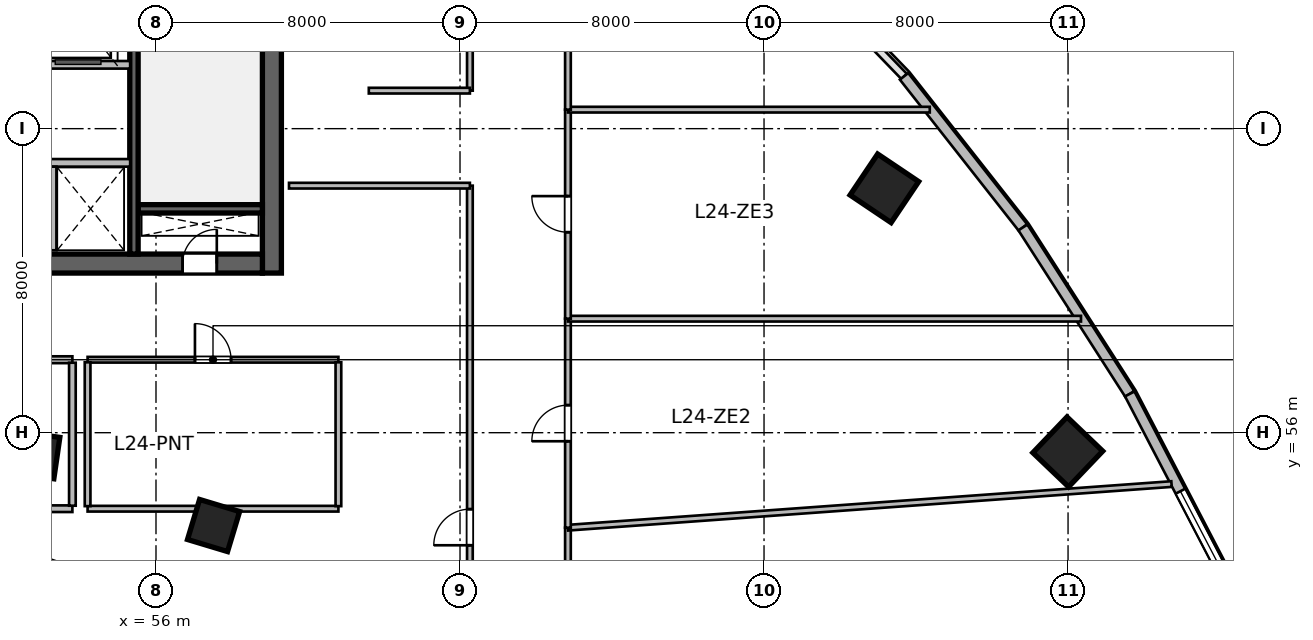
"""IFC4 building model, lengths in metres.
Left out: names, types, materials, properties, quantities, classifications, styles, units other than length and angle.
Written with IfcOpenShell. Run it as: python <this file> out.ifc"""

import sys

from ifc_helpers import new_model, si_unit, direction, frame, frame_2d, origin, origin_2d, place, context, subcontext, project, spatial, rectangle, extrude, source, transform, mapped, element, fill, save


model = new_model("IFC4")
c1 = context("Model", 3, precision=1e-05, world=origin(), true_north=direction((0.0, 1.0)))
c2 = subcontext(c1, "Body", "Model", "MODEL_VIEW")
j1 = project(units=[si_unit("LENGTHUNIT", "METRE"), si_unit("PLANEANGLEUNIT", "RADIAN")], contexts=[c1])
p1 = place(None, origin())
s1 = spatial("IfcSite", under=j1, at=p1, CompositionType="ELEMENT")
p2 = place(p1, origin())
s2 = spatial("IfcBuilding", under=s1, at=p2, CompositionType="ELEMENT")
p3 = place(p2, frame((0.0, 0.0, 103.8)))
s3 = spatial("IfcBuildingStorey", under=s2, at=p3, CompositionType="ELEMENT", Elevation=103.8)
m1 = source(origin(), c2, "Body", "SweptSolid", [
    extrude(rectangle(XDim=12.0, YDim=0.5, at=frame_2d((6.0, 0.0))), origin(), (0.0, 0.0, 1.0), 3.9),
])
p4 = place(p3, frame((59.05, 60.2, 0.0), z_axis=(0.0, 0.0, 1.0), x_axis=(0.0, 1.0, 0.0)))
e1 = element("IfcWall", 1, at=p4, inside=s3, PredefinedType="SHEAR", context=c2, shape_type="MappedRepresentation", body=[
    mapped(m1, transform((0.0, 0.0, 0.0), scale=1.0)),
])
m2 = source(origin(), c2, "Body", "SweptSolid", [
    extrude(rectangle(XDim=21.6, YDim=0.5, at=frame_2d((10.8, 0.0))), origin(), (0.0, 0.0, 1.0), 3.9),
])
p5 = place(p3, frame((37.2, 60.45, 0.0), z_axis=(0.0, 0.0, 1.0), x_axis=(1.0, 0.0, 0.0)))
e2 = element("IfcWall", 2, at=p5, inside=s3, PredefinedType="SHEAR", context=c2, shape_type="MappedRepresentation", body=[
    mapped(m2, transform((0.0, 0.0, 0.0), scale=1.0)),
])
p6 = place(p5, frame((1.1, 0.0, 0.0)))
e3 = element("IfcOpeningElement", 3, at=p6, cuts=e2, PredefinedType="OPENING", context=c2, shape_type="SweptSolid", body=[
    extrude(rectangle(XDim=1.15, YDim=2.15, at=frame_2d((0.575, 1.075))), frame((0.0, 0.26, 0.0), z_axis=(0.0, -1.0, 0.0), x_axis=(1.0, 0.0, 0.0)), (0.0, 0.0, 1.0), 0.52),
])
p7 = place(p5, frame((19.5, 0.0, 0.0)))
e4 = element("IfcOpeningElement", 4, at=p7, cuts=e2, PredefinedType="OPENING", context=c2, shape_type="SweptSolid", body=[
    extrude(rectangle(XDim=0.9, YDim=2.1, at=frame_2d((0.45, 1.05))), frame((0.0, 0.26, 0.0), z_axis=(0.0, -1.0, 0.0), x_axis=(1.0, 0.0, 0.0)), (0.0, 0.0, 1.0), 0.52),
])
p8 = place(p5, frame((12.02, 0.0, 0.0)))
e5 = element("IfcOpeningElement", 5, at=p8, cuts=e2, PredefinedType="OPENING", context=c2, shape_type="SweptSolid", body=[
    extrude(rectangle(XDim=1.6, YDim=2.15, at=frame_2d((0.8, 1.075))), frame((0.0, 0.26, 0.0), z_axis=(0.0, -1.0, 0.0), x_axis=(1.0, 0.0, 0.0)), (0.0, 0.0, 1.0), 0.52),
])
m3 = source(origin(), c2, "Body", "SweptSolid", [
    extrude(rectangle(XDim=3.27, YDim=0.22, at=frame_2d((1.635, 0.0))), origin(), (0.0, 0.0, 1.0), 3.9),
])
p9 = place(p3, frame((55.53, 61.89, 0.0), z_axis=(0.0, 0.0, 1.0), x_axis=(1.0, 0.0, 0.0)))
e6 = element("IfcWall", 6, at=p9, inside=s3, PredefinedType="SHEAR", context=c2, shape_type="MappedRepresentation", body=[
    mapped(m3, transform((0.0, 0.0, 0.0), scale=1.0)),
])
m4 = source(origin(), c2, "Body", "SweptSolid", [
    extrude(rectangle(XDim=11.0, YDim=0.22, at=frame_2d((5.5, 0.0))), origin(), (0.0, 0.0, 1.0), 3.9),
])
p10 = place(p3, frame((55.42, 60.7, 0.0), z_axis=(0.0, 0.0, 1.0), x_axis=(0.0, 1.0, 0.0)))
e7 = element("IfcWall", 7, at=p10, inside=s3, PredefinedType="SHEAR", context=c2, shape_type="MappedRepresentation", body=[
    mapped(m4, transform((0.0, 0.0, 0.0), scale=1.0)),
])
p11 = place(p10, frame((9.545, 0.0, 0.0)))
e8 = element("IfcOpeningElement", 8, at=p11, cuts=e7, PredefinedType="OPENING", context=c2, shape_type="SweptSolid", body=[
    extrude(rectangle(XDim=1.15, YDim=2.15, at=frame_2d((0.575, 1.075))), frame((0.0, 0.12, 0.0), z_axis=(0.0, -1.0, 0.0), x_axis=(1.0, 0.0, 0.0)), (0.0, 0.0, 1.0), 0.24),
])
m5 = source(origin(), c2, "Body", "SweptSolid", [
    extrude(rectangle(XDim=1.1, YDim=1.1, at=origin_2d()), origin(), (0.0, 0.0, 1.0), 3.9),
])
for number, where, z_axis, x_axis in (
    (9, (52.846, 55.411, 0.0), (0.0, 0.0, 1.0), (0.143, 0.99, 0.0)),
    (10, (57.515, 53.558, 0.0), (0.0, 0.0, 1.0), (0.289, 0.957, 0.0)),
):
    element("IfcColumn", number, at=place(p3, frame(where, z_axis=z_axis, x_axis=x_axis)), inside=s3, PredefinedType="COLUMN", context=c2, shape_type="MappedRepresentation", body=[
        mapped(m5, transform((0.0, 0.0, 0.0), scale=1.0)),
    ])
m6 = source(origin(), c2, "Body", "SweptSolid", [
    extrude(rectangle(XDim=1.3, YDim=1.3, at=origin_2d()), origin(), (0.0, 0.0, 1.0), 3.9),
])
for number, where, z_axis, x_axis in (
    (11, (75.167, 62.43, 0.0), (0.0, 0.0, 1.0), (0.558, 0.83, 0.0)),
    (12, (79.993, 55.494, 0.0), (0.0, 0.0, 1.0), (0.691, 0.723, 0.0)),
):
    element("IfcColumn", number, at=place(p3, frame(where, z_axis=z_axis, x_axis=x_axis)), inside=s3, PredefinedType="COLUMN", context=c2, shape_type="MappedRepresentation", body=[
        mapped(m6, transform((0.0, 0.0, 0.0), scale=1.0)),
    ])
m7 = source(origin(), c2, "Body", "SweptSolid", [
    extrude(rectangle(XDim=2.411, YDim=0.28, at=frame_2d((1.205, 0.0))), origin(), (0.0, 0.0, 1.0), 3.65),
])
p12 = place(p3, frame((55.012, 51.899, 0.0), z_axis=(0.0, 0.0, 1.0), x_axis=(-0.944880068161, 0.327416640982, 0.0)))
e13 = element("IfcWall", 13, at=p12, inside=s3, PredefinedType="SOLIDWALL", context=c2, shape_type="MappedRepresentation", body=[
    mapped(m7, transform((0.0, 0.0, 0.0), scale=1.0)),
])
m8 = source(origin(), c2, "Body", "SweptSolid", [
    extrude(rectangle(XDim=5.058, YDim=0.28, at=frame_2d((2.529, 0.0))), origin(), (0.0, 0.0, 1.0), 3.65),
])
p13 = place(p3, frame((75.685, 65.376, 0.0), z_axis=(0.0, 0.0, 1.0), x_axis=(0.618145507434, -0.786063694391, 0.0)))
e14 = element("IfcWall", 14, at=p13, inside=s3, PredefinedType="SOLIDWALL", context=c2, shape_type="MappedRepresentation", body=[
    mapped(m8, transform((0.0, 0.0, 0.0), scale=1.0)),
])
m9 = source(origin(), c2, "Body", "SweptSolid", [
    extrude(rectangle(XDim=5.205, YDim=0.28, at=frame_2d((2.603, 0.0))), origin(), (0.0, 0.0, 1.0), 3.65),
])
p14 = place(p3, frame((78.812, 61.4, 0.0), z_axis=(0.0, 0.0, 1.0), x_axis=(0.540188528895, -0.8415440293, 0.0)))
e15 = element("IfcWall", 15, at=p14, inside=s3, PredefinedType="SOLIDWALL", context=c2, shape_type="MappedRepresentation", body=[
    mapped(m9, transform((0.0, 0.0, 0.0), scale=1.0)),
])
m10 = source(origin(), c2, "Body", "SweptSolid", [
    extrude(rectangle(XDim=5.315, YDim=0.28, at=frame_2d((2.658, 0.0))), origin(), (0.0, 0.0, 1.0), 3.65),
])
p15 = place(p3, frame((81.623, 57.02, 0.0), z_axis=(0.0, 0.0, 1.0), x_axis=(0.461760527822, -0.887004630735, 0.0)))
e16 = element("IfcWall", 16, at=p15, inside=s3, PredefinedType="SOLIDWALL", context=c2, shape_type="MappedRepresentation", body=[
    mapped(m10, transform((0.0, 0.0, 0.0), scale=1.0)),
])
p16 = place(p15, frame((2.886, 0.0, 0.95)))
e17 = element("IfcOpeningElement", 17, at=p16, cuts=e16, PredefinedType="OPENING", context=c2, shape_type="SweptSolid", body=[
    extrude(rectangle(XDim=2.2, YDim=2.1, at=frame_2d((1.1, 1.05))), frame((0.0, 0.15, 0.0), z_axis=(0.0, -1.0, 0.0), x_axis=(1.0, 0.0, 0.0)), (0.0, 0.0, 1.0), 0.3),
])
m11 = source(origin(), c2, "Body", "SweptSolid", [
    extrude(rectangle(XDim=5.62, YDim=0.2, at=frame_2d((2.81, 0.0))), origin(), (0.0, 0.0, 1.0), 3.65),
])
p17 = place(p3, frame((49.7, 65.68, 0.0), z_axis=(0.0, 0.0, 1.0), x_axis=(1.0, 0.0, 0.0)))
e18 = element("IfcWall", 18, at=p17, inside=s3, PredefinedType="SOLIDWALL", context=c2, shape_type="MappedRepresentation", body=[
    mapped(m11, transform((0.0, 0.0, 0.0), scale=1.0)),
])
m12 = source(origin(), c2, "Body", "SweptSolid", [
    extrude(rectangle(XDim=4.1, YDim=0.2, at=frame_2d((2.05, 0.0))), origin(), (0.0, 0.0, 1.0), 3.65),
])
p18 = place(p3, frame((51.22, 63.1, 0.0), z_axis=(0.0, 0.0, 1.0), x_axis=(1.0, 0.0, 0.0)))
e19 = element("IfcWall", 19, at=p18, inside=s3, PredefinedType="SOLIDWALL", context=c2, shape_type="MappedRepresentation", body=[
    mapped(m12, transform((0.0, 0.0, 0.0), scale=1.0)),
])
m13 = source(origin(), c2, "Body", "SweptSolid", [
    extrude(rectangle(XDim=2.2, YDim=0.2, at=frame_2d((1.1, 0.0))), origin(), (0.0, 0.0, 1.0), 3.65),
])
p19 = place(p3, frame((53.28, 60.8, 0.0), z_axis=(0.0, 0.0, 1.0), x_axis=(0.0, 1.0, 0.0)))
e20 = element("IfcWall", 20, at=p19, inside=s3, PredefinedType="SOLIDWALL", context=c2, shape_type="MappedRepresentation", body=[
    mapped(m13, transform((0.0, 0.0, 0.0), scale=1.0)),
])
m14 = source(origin(), c2, "Body", "SweptSolid", [
    extrude(rectangle(XDim=3.248, YDim=0.175, at=frame_2d((1.624, 0.0))), origin(), (0.0, 0.0, 1.0), 3.65),
])
p20 = place(p3, frame((50.552, 54.0, 0.0), z_axis=(0.0, 0.0, 1.0), x_axis=(1.0, 0.0, 0.0)))
e21 = element("IfcWall", 21, at=p20, inside=s3, PredefinedType="PARTITIONING", context=c2, shape_type="MappedRepresentation", body=[
    mapped(m14, transform((0.0, 0.0, 0.0), scale=1.0)),
])
m15 = source(origin(), c2, "Body", "SweptSolid", [
    extrude(rectangle(XDim=3.248, YDim=0.18, at=frame_2d((1.624, 0.0))), origin(), (0.0, 0.0, 1.0), 3.65),
])
p21 = place(p3, frame((50.552, 57.92, 0.0), z_axis=(0.0, 0.0, 1.0), x_axis=(1.0, 0.0, 0.0)))
e22 = element("IfcWall", 22, at=p21, inside=s3, PredefinedType="PLUMBINGWALL", context=c2, shape_type="MappedRepresentation", body=[
    mapped(m15, transform((0.0, 0.0, 0.0), scale=1.0)),
])
p22 = place(p21, frame((1.149, 0.0, 0.0)))
e23 = element("IfcOpeningElement", 23, at=p22, cuts=e22, PredefinedType="OPENING", context=c2, shape_type="SweptSolid", body=[
    extrude(rectangle(XDim=0.95, YDim=2.12, at=frame_2d((0.475, 1.06))), frame((0.0, 0.1, 0.0), z_axis=(0.0, -1.0, 0.0), x_axis=(1.0, 0.0, 0.0)), (0.0, 0.0, 1.0), 0.2),
])
m16 = source(origin(), c2, "Body", "SweptSolid", [
    extrude(rectangle(XDim=3.763, YDim=0.175, at=frame_2d((1.881, 0.0))), origin(), (0.0, 0.0, 1.0), 3.65),
])
p23 = place(p3, frame((53.8, 54.079, 0.0), z_axis=(0.0, 0.0, 1.0), x_axis=(0.0, 1.0, 0.0)))
e24 = element("IfcWall", 24, at=p23, inside=s3, PredefinedType="PARTITIONING", context=c2, shape_type="MappedRepresentation", body=[
    mapped(m16, transform((0.0, 0.0, 0.0), scale=1.0)),
])
m17 = source(origin(), c2, "Body", "SweptSolid", [
    extrude(rectangle(XDim=6.6, YDim=0.15, at=frame_2d((3.3, 0.0))), origin(), (0.0, 0.0, 1.0), 3.095),
])
p24 = place(p3, frame((54.2, 54.0, 0.0), z_axis=(0.0, 0.0, 1.0), x_axis=(1.0, 0.0, 0.0)))
e25 = element("IfcWall", 25, at=p24, inside=s3, PredefinedType="PARTITIONING", context=c2, shape_type="MappedRepresentation", body=[
    mapped(m17, transform((0.0, 0.0, 0.0), scale=1.0)),
])
m18 = source(origin(), c2, "Body", "SweptSolid", [
    extrude(rectangle(XDim=6.6, YDim=0.15, at=frame_2d((3.3, 0.0))), origin(), (0.0, 0.0, 1.0), 3.65),
])
p25 = place(p3, frame((54.2, 57.92, 0.0), z_axis=(0.0, 0.0, 1.0), x_axis=(1.0, 0.0, 0.0)))
e26 = element("IfcWall", 26, at=p25, inside=s3, PredefinedType="PARTITIONING", context=c2, shape_type="MappedRepresentation", body=[
    mapped(m18, transform((0.0, 0.0, 0.0), scale=1.0)),
])
p26 = place(p25, frame((2.825, 0.0, 0.0)))
e27 = element("IfcOpeningElement", 27, at=p26, cuts=e26, PredefinedType="OPENING", context=c2, shape_type="SweptSolid", body=[
    extrude(rectangle(XDim=0.95, YDim=2.1, at=frame_2d((0.475, 1.05))), frame((0.0, 0.085, 0.0), z_axis=(0.0, -1.0, 0.0), x_axis=(1.0, 0.0, 0.0)), (0.0, 0.0, 1.0), 0.17),
])
m19 = source(origin(), c2, "Body", "SweptSolid", [
    extrude(rectangle(XDim=3.785, YDim=0.15, at=frame_2d((1.893, 0.0))), origin(), (0.0, 0.0, 1.0), 3.65),
])
for number, where, z_axis, x_axis in (
    (28, (54.2, 54.067, 0.0), (0.0, 0.0, 1.0), (0.0, 1.0, 0.0)),
    (29, (60.8, 54.067, 0.0), (0.0, 0.0, 1.0), (0.0, 1.0, 0.0)),
):
    element("IfcWall", number, at=place(p3, frame(where, z_axis=z_axis, x_axis=x_axis)), inside=s3, PredefinedType="PARTITIONING", context=c2, shape_type="MappedRepresentation", body=[
        mapped(m19, transform((0.0, 0.0, 0.0), scale=1.0)),
    ])
m20 = source(origin(), c2, "Body", "SweptSolid", [
    extrude(rectangle(XDim=12.894, YDim=0.15, at=frame_2d((6.447, 0.0))), origin(), (0.0, 0.0, 1.0), 2.942),
])
p27 = place(p3, frame((66.84, 40.606, 0.0), z_axis=(0.0, 0.0, 1.0), x_axis=(0.0, 1.0, 0.0)))
e30 = element("IfcWall", 30, at=p27, inside=s3, PredefinedType="PARTITIONING", context=c2, shape_type="MappedRepresentation", body=[
    mapped(m20, transform((0.0, 0.0, 0.0), scale=1.0)),
])
p28 = place(p27, frame((9.744, 0.0, 0.0)))
e31 = element("IfcOpeningElement", 31, at=p28, cuts=e30, PredefinedType="OPENING", context=c2, shape_type="SweptSolid", body=[
    extrude(rectangle(XDim=0.95, YDim=2.1, at=frame_2d((0.475, 1.05))), frame((0.0, 0.085, 0.0), z_axis=(0.0, -1.0, 0.0), x_axis=(1.0, 0.0, 0.0)), (0.0, 0.0, 1.0), 0.17),
])
m21 = source(origin(), c2, "Body", "SweptSolid", [
    extrude(rectangle(XDim=15.924, YDim=0.15, at=frame_2d((7.962, 0.0))), origin(), (0.0, 0.0, 1.0), 3.65),
])
p29 = place(p3, frame((66.84, 53.5, 0.0), z_axis=(0.0, 0.0, 1.0), x_axis=(0.997397082693, 0.072104503572, 0.0)))
e32 = element("IfcWall", 32, at=p29, inside=s3, PredefinedType="PARTITIONING", context=c2, shape_type="MappedRepresentation", body=[
    mapped(m21, transform((0.0, 0.0, 0.0), scale=1.0)),
])
m22 = source(origin(), c2, "Body", "SweptSolid", [
    extrude(rectangle(XDim=5.5, YDim=0.15, at=frame_2d((2.75, 0.0))), origin(), (0.0, 0.0, 1.0), 3.022),
])
p30 = place(p3, frame((66.84, 53.5, 0.0), z_axis=(0.0, 0.0, 1.0), x_axis=(0.0, 1.0, 0.0)))
e33 = element("IfcWall", 33, at=p30, inside=s3, PredefinedType="PARTITIONING", context=c2, shape_type="MappedRepresentation", body=[
    mapped(m22, transform((0.0, 0.0, 0.0), scale=1.0)),
])
p31 = place(p30, frame((2.275, 0.0, 0.0)))
e34 = element("IfcOpeningElement", 34, at=p31, cuts=e33, PredefinedType="OPENING", context=c2, shape_type="SweptSolid", body=[
    extrude(rectangle(XDim=0.95, YDim=2.1, at=frame_2d((0.475, 1.05))), frame((0.0, 0.085, 0.0), z_axis=(0.0, -1.0, 0.0), x_axis=(1.0, 0.0, 0.0)), (0.0, 0.0, 1.0), 0.17),
])
m23 = source(origin(), c2, "Body", "SweptSolid", [
    extrude(rectangle(XDim=13.5, YDim=0.15, at=frame_2d((6.75, 0.0))), origin(), (0.0, 0.0, 1.0), 3.65),
])
p32 = place(p3, frame((66.84, 59.0, 0.0), z_axis=(0.0, 0.0, 1.0), x_axis=(1.0, 0.0, 0.0)))
e35 = element("IfcWall", 35, at=p32, inside=s3, PredefinedType="PARTITIONING", context=c2, shape_type="MappedRepresentation", body=[
    mapped(m23, transform((0.0, 0.0, 0.0), scale=1.0)),
])
m24 = source(origin(), c2, "Body", "SweptSolid", [
    extrude(rectangle(XDim=5.5, YDim=0.15, at=frame_2d((2.75, 0.0))), origin(), (0.0, 0.0, 1.0), 2.942),
])
p33 = place(p3, frame((66.84, 59.0, 0.0), z_axis=(0.0, 0.0, 1.0), x_axis=(0.0, 1.0, 0.0)))
e36 = element("IfcWall", 36, at=p33, inside=s3, PredefinedType="PARTITIONING", context=c2, shape_type="MappedRepresentation", body=[
    mapped(m24, transform((0.0, 0.0, 0.0), scale=1.0)),
])
p34 = place(p33, frame((2.275, 0.0, 0.0)))
e37 = element("IfcOpeningElement", 37, at=p34, cuts=e36, PredefinedType="OPENING", context=c2, shape_type="SweptSolid", body=[
    extrude(rectangle(XDim=0.95, YDim=2.1, at=frame_2d((0.475, 1.05))), frame((0.0, 0.085, 0.0), z_axis=(0.0, -1.0, 0.0), x_axis=(1.0, 0.0, 0.0)), (0.0, 0.0, 1.0), 0.17),
])
m25 = source(origin(), c2, "Body", "SweptSolid", [
    extrude(rectangle(XDim=9.521, YDim=0.15, at=frame_2d((4.761, 0.0))), origin(), (0.0, 0.0, 1.0), 3.65),
])
p35 = place(p3, frame((66.84, 64.5, 0.0), z_axis=(0.0, 0.0, 1.0), x_axis=(1.0, 0.0, 0.0)))
e38 = element("IfcWall", 38, at=p35, inside=s3, PredefinedType="PARTITIONING", context=c2, shape_type="MappedRepresentation", body=[
    mapped(m25, transform((0.0, 0.0, 0.0), scale=1.0)),
])
m26 = source(origin(), c2, "Body", "SweptSolid", [
    extrude(rectangle(XDim=8.613, YDim=0.15, at=frame_2d((4.307, 0.0))), origin(), (0.0, 0.0, 1.0), 3.65),
])
p36 = place(p3, frame((66.84, 64.5, 0.0), z_axis=(0.0, 0.0, 1.0), x_axis=(0.0, 1.0, 0.0)))
e39 = element("IfcWall", 39, at=p36, inside=s3, PredefinedType="PARTITIONING", context=c2, shape_type="MappedRepresentation", body=[
    mapped(m26, transform((0.0, 0.0, 0.0), scale=1.0)),
])
p37 = place(p36, frame((3.832, 0.0, 0.0)))
e40 = element("IfcOpeningElement", 40, at=p37, cuts=e39, PredefinedType="OPENING", context=c2, shape_type="SweptSolid", body=[
    extrude(rectangle(XDim=0.95, YDim=2.1, at=frame_2d((0.475, 1.05))), frame((0.0, 0.085, 0.0), z_axis=(0.0, -1.0, 0.0), x_axis=(1.0, 0.0, 0.0)), (0.0, 0.0, 1.0), 0.17),
])
m27 = source(origin(), c2, "Body", "SweptSolid", [
    extrude(rectangle(XDim=17.974, YDim=0.15, at=frame_2d((8.987, 0.0))), origin(), (0.0, 0.0, 1.0), 2.942),
])
p38 = place(p3, frame((64.26, 44.526, 0.0), z_axis=(0.0, 0.0, 1.0), x_axis=(0.0, 1.0, 0.0)))
e41 = element("IfcWall", 41, at=p38, inside=s3, PredefinedType="PARTITIONING", context=c2, shape_type="MappedRepresentation", body=[
    mapped(m27, transform((0.0, 0.0, 0.0), scale=1.0)),
])
p39 = place(p38, frame((8.512, 0.0, 0.0)))
e42 = element("IfcOpeningElement", 42, at=p39, cuts=e41, PredefinedType="OPENING", context=c2, shape_type="SweptSolid", body=[
    extrude(rectangle(XDim=0.95, YDim=2.1, at=frame_2d((0.475, 1.05))), frame((0.0, 0.085, 0.0), z_axis=(0.0, -1.0, 0.0), x_axis=(1.0, 0.0, 0.0)), (0.0, 0.0, 1.0), 0.17),
])
m28 = source(origin(), c2, "Body", "SweptSolid", [
    extrude(rectangle(XDim=4.76, YDim=0.15, at=frame_2d((2.38, 0.0))), origin(), (0.0, 0.0, 1.0), 3.65),
])
p40 = place(p3, frame((59.5, 62.5, 0.0), z_axis=(0.0, 0.0, 1.0), x_axis=(1.0, 0.0, 0.0)))
e43 = element("IfcWall", 43, at=p40, inside=s3, PredefinedType="PARTITIONING", context=c2, shape_type="MappedRepresentation", body=[
    mapped(m28, transform((0.0, 0.0, 0.0), scale=1.0)),
])
m29 = source(origin(), c2, "Body", "SweptSolid", [
    extrude(rectangle(XDim=9.729, YDim=0.15, at=frame_2d((4.864, 0.0))), origin(), (0.0, 0.0, 1.0), 3.65),
])
p41 = place(p3, frame((64.26, 65.0, 0.0), z_axis=(0.0, 0.0, 1.0), x_axis=(0.0, 1.0, 0.0)))
e44 = element("IfcWall", 44, at=p41, inside=s3, PredefinedType="PARTITIONING", context=c2, shape_type="MappedRepresentation", body=[
    mapped(m29, transform((0.0, 0.0, 0.0), scale=1.0)),
])
p42 = place(p41, frame((3.65, 0.0, 0.0)))
e45 = element("IfcOpeningElement", 45, at=p42, cuts=e44, PredefinedType="OPENING", context=c2, shape_type="SweptSolid", body=[
    extrude(rectangle(XDim=0.95, YDim=2.1, at=frame_2d((0.475, 1.05))), frame((0.0, 0.085, 0.0), z_axis=(0.0, -1.0, 0.0), x_axis=(1.0, 0.0, 0.0)), (0.0, 0.0, 1.0), 0.17),
])
m30 = source(origin(), c2, "Body", "SweptSolid", [
    extrude(rectangle(XDim=2.66, YDim=0.15, at=frame_2d((1.33, 0.0))), origin(), (0.0, 0.0, 1.0), 3.65),
])
p43 = place(p3, frame((61.6, 65.0, 0.0), z_axis=(0.0, 0.0, 1.0), x_axis=(1.0, 0.0, 0.0)))
e46 = element("IfcWall", 46, at=p43, inside=s3, PredefinedType="PARTITIONING", context=c2, shape_type="MappedRepresentation", body=[
    mapped(m30, transform((0.0, 0.0, 0.0), scale=1.0)),
])
m31 = source(origin(), c2, "Body", "SweptSolid", [
    extrude(rectangle(XDim=2.2, YDim=2.1, at=frame_2d((1.1, 1.05))), frame((0.0, 0.03, 0.0), z_axis=(0.0, -1.0, 0.0), x_axis=(1.0, 0.0, 0.0)), (0.0, 0.0, 1.0), 0.06),
])
p44 = place(p16, origin())
e47 = element("IfcWindow", 47, at=p44, inside=s3, PartitioningType="TRIPLE_PANEL_VERTICAL", PredefinedType="WINDOW", context=c2, shape_type="MappedRepresentation", body=[
    mapped(m31, transform((0.0, 0.0, 0.0), scale=1.0)),
])
fill(e17, e47)
m32 = source(origin(), c2, "Body", "SweptSolid", [
    extrude(rectangle(XDim=0.9, YDim=2.1, at=frame_2d((0.45, 1.05))), frame((0.0, 0.025, 0.0), z_axis=(0.0, -1.0, 0.0), x_axis=(1.0, 0.0, 0.0)), (0.0, 0.0, 1.0), 0.05),
])
p45 = place(p7, origin())
e48 = element("IfcDoor", 48, at=p45, inside=s3, OperationType="SINGLE_SWING_RIGHT", PredefinedType="DOOR", context=c2, shape_type="MappedRepresentation", body=[
    mapped(m32, transform((0.0, 0.0, 0.0), scale=1.0)),
])
fill(e4, e48)
m33 = source(origin(), c2, "Body", "SweptSolid", [
    extrude(rectangle(XDim=0.95, YDim=2.1, at=frame_2d((0.475, 1.05))), frame((0.0, 0.025, 0.0), z_axis=(0.0, -1.0, 0.0), x_axis=(1.0, 0.0, 0.0)), (0.0, 0.0, 1.0), 0.05),
])
p46 = place(p26, origin())
e49 = element("IfcDoor", 49, at=p46, inside=s3, OperationType="SINGLE_SWING_LEFT", PredefinedType="DOOR", context=c2, shape_type="MappedRepresentation", body=[
    mapped(m33, transform((0.0, 0.0, 0.0), scale=1.0)),
])
fill(e27, e49)
p47 = place(p31, origin())
e50 = element("IfcDoor", 50, at=p47, inside=s3, OperationType="SINGLE_SWING_LEFT", PredefinedType="DOOR", context=c2, shape_type="MappedRepresentation", body=[
    mapped(m33, transform((0.0, 0.0, 0.0), scale=1.0)),
])
fill(e34, e50)
p48 = place(p34, origin())
e51 = element("IfcDoor", 51, at=p48, inside=s3, OperationType="SINGLE_SWING_RIGHT", PredefinedType="DOOR", context=c2, shape_type="MappedRepresentation", body=[
    mapped(m33, transform((0.0, 0.0, 0.0), scale=1.0)),
])
fill(e37, e51)
p49 = place(p39, origin())
e52 = element("IfcDoor", 52, at=p49, inside=s3, OperationType="SINGLE_SWING_LEFT", PredefinedType="DOOR", context=c2, shape_type="MappedRepresentation", body=[
    mapped(m33, transform((0.0, 0.0, 0.0), scale=1.0)),
])
fill(e42, e52)
save(model, sys.argv[1])
